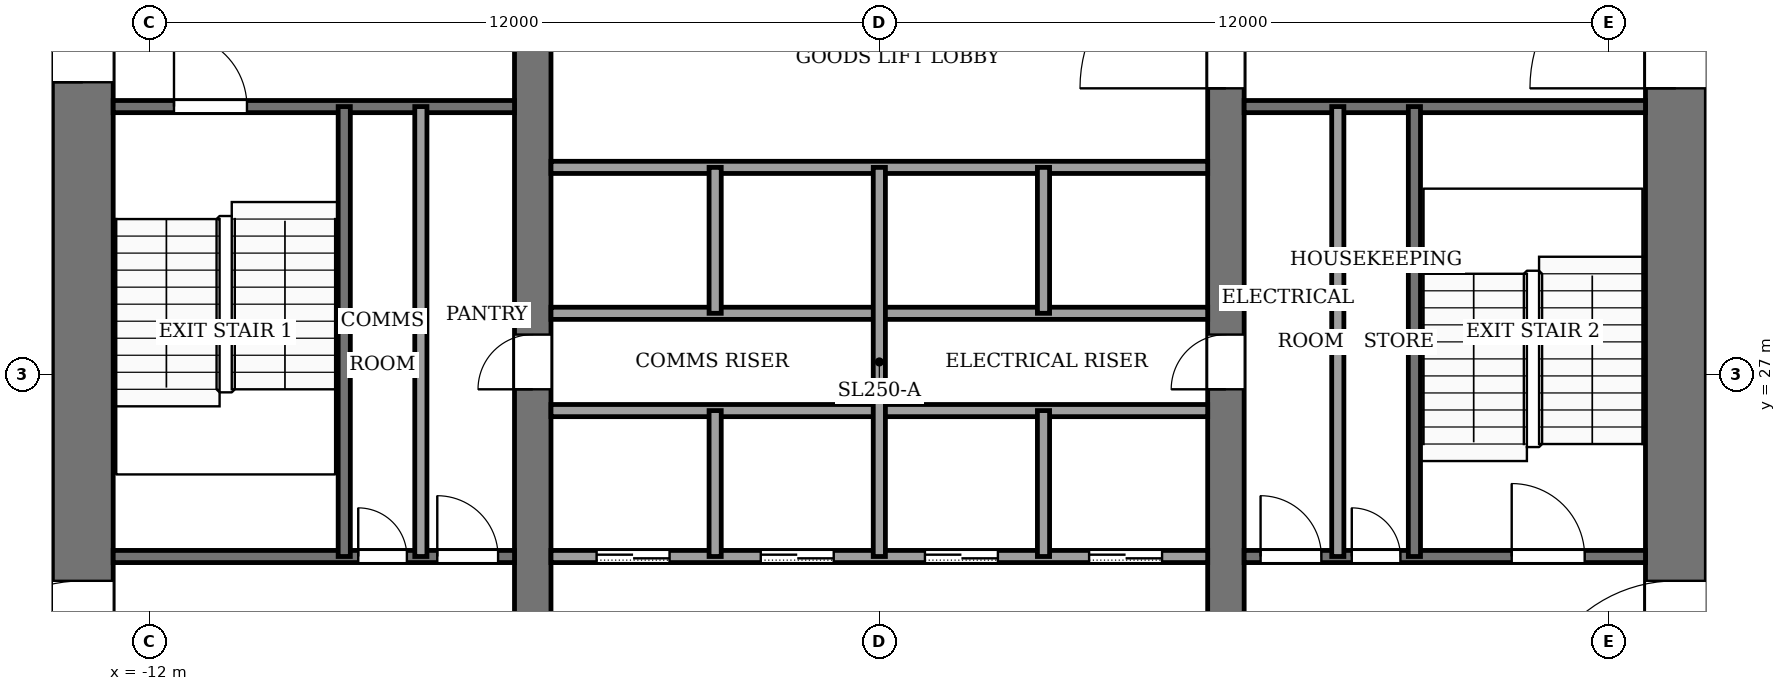
"""IFC4 building model, lengths in metres.
Left out: names, types, materials, properties, quantities, classifications, styles, units other than length and angle.
Written with IfcOpenShell. Run it as: python <this file> out.ifc"""

import sys

from ifc_helpers import new_model, si_unit, direction, frame, frame_2d, origin, place, context, subcontext, project, spatial, rectangle, extrude, element, fill, save


model = new_model("IFC4")
c1 = context("Model", 3, precision=1e-05, world=origin(), true_north=direction((0.0, 1.0)))
c2 = subcontext(c1, "Body", "Model", "MODEL_VIEW")
j1 = project(units=[si_unit("LENGTHUNIT", "METRE"), si_unit("PLANEANGLEUNIT", "RADIAN")], contexts=[c1])
p1 = place(None, origin())
s1 = spatial("IfcSite", under=j1, at=p1, CompositionType="ELEMENT")
p2 = place(p1, origin())
s2 = spatial("IfcBuilding", under=s1, at=p2, CompositionType="ELEMENT")
p3 = place(p2, frame((0.0, 0.0, 130.0)))
s3 = spatial("IfcBuildingStorey", under=s2, at=p3, CompositionType="ELEMENT", Elevation=130.0)
p4 = place(p3, frame((-13.1, 18.4, -0.13), z_axis=(0.0, 0.0, 1.0), x_axis=(0.0, 1.0, 0.0)))
e1 = element("IfcWall", 1, at=p4, inside=s3, PredefinedType="SHEAR", context=c2, shape_type="SweptSolid", body=[
    extrude(rectangle(XDim=19.2, YDim=1.0, at=frame_2d((9.6, 0.0))), origin(), (0.0, 0.0, 1.0), 4.0),
])
p5 = place(p4, frame((2.8, 0.0, 0.13)))
e2 = element("IfcOpeningElement", 2, at=p5, cuts=e1, PredefinedType="OPENING", context=c2, shape_type="SweptSolid", body=[
    extrude(rectangle(XDim=2.4, YDim=2.4, at=frame_2d((1.2, 1.2))), frame((0.0, 0.51, 0.0), z_axis=(0.0, -1.0, 0.0), x_axis=(1.0, 0.0, 0.0)), (0.0, 0.0, 1.0), 1.02),
])
p6 = place(p4, frame((13.4, 0.0, 0.13)))
e3 = element("IfcOpeningElement", 3, at=p6, cuts=e1, PredefinedType="OPENING", context=c2, shape_type="SweptSolid", body=[
    extrude(rectangle(XDim=1.4, YDim=2.2, at=frame_2d((0.7, 1.1))), frame((0.0, 0.51, 0.0), z_axis=(0.0, -1.0, 0.0), x_axis=(1.0, 0.0, 0.0)), (0.0, 0.0, 1.0), 1.02),
])
p7 = place(p3, frame((13.1, 18.4, -0.13), z_axis=(0.0, 0.0, 1.0), x_axis=(0.0, 1.0, 0.0)))
e4 = element("IfcWall", 4, at=p7, inside=s3, PredefinedType="SHEAR", context=c2, shape_type="SweptSolid", body=[
    extrude(rectangle(XDim=19.2, YDim=1.0, at=frame_2d((9.6, 0.0))), origin(), (0.0, 0.0, 1.0), 4.0),
])
p8 = place(p7, frame((2.8, 0.0, 0.13)))
e5 = element("IfcOpeningElement", 5, at=p8, cuts=e4, PredefinedType="OPENING", context=c2, shape_type="SweptSolid", body=[
    extrude(rectangle(XDim=2.4, YDim=2.4, at=frame_2d((1.2, 1.2))), frame((0.0, 0.51, 0.0), z_axis=(0.0, -1.0, 0.0), x_axis=(1.0, 0.0, 0.0)), (0.0, 0.0, 1.0), 1.02),
])
p9 = place(p7, frame((13.3, 0.0, 0.13)))
e6 = element("IfcOpeningElement", 6, at=p9, cuts=e4, PredefinedType="OPENING", context=c2, shape_type="SweptSolid", body=[
    extrude(rectangle(XDim=2.4, YDim=2.4, at=frame_2d((1.2, 1.2))), frame((0.0, 0.51, 0.0), z_axis=(0.0, -1.0, 0.0), x_axis=(1.0, 0.0, 0.0)), (0.0, 0.0, 1.0), 1.02),
])
p10 = place(p3, frame((-5.7, 18.4, -0.13), z_axis=(0.0, 0.0, 1.0), x_axis=(0.0, 1.0, 0.0)))
e7 = element("IfcWall", 7, at=p10, inside=s3, PredefinedType="SHEAR", context=c2, shape_type="SweptSolid", body=[
    extrude(rectangle(XDim=19.2, YDim=0.6, at=frame_2d((9.6, 0.0))), origin(), (0.0, 0.0, 1.0), 4.0),
])
p11 = place(p10, frame((8.35, 0.0, 0.13)))
e8 = element("IfcOpeningElement", 8, at=p11, cuts=e7, PredefinedType="OPENING", context=c2, shape_type="SweptSolid", body=[
    extrude(rectangle(XDim=0.9, YDim=2.1, at=frame_2d((0.45, 1.05))), frame((0.0, 0.31, 0.0), z_axis=(0.0, -1.0, 0.0), x_axis=(1.0, 0.0, 0.0)), (0.0, 0.0, 1.0), 0.62),
])
p12 = place(p3, frame((5.7, 18.4, -0.13), z_axis=(0.0, 0.0, 1.0), x_axis=(0.0, 1.0, 0.0)))
e9 = element("IfcWall", 9, at=p12, inside=s3, PredefinedType="SHEAR", context=c2, shape_type="SweptSolid", body=[
    extrude(rectangle(XDim=19.2, YDim=0.6, at=frame_2d((9.6, 0.0))), origin(), (0.0, 0.0, 1.0), 4.0),
])
p13 = place(p12, frame((8.35, 0.0, 0.13)))
e10 = element("IfcOpeningElement", 10, at=p13, cuts=e9, PredefinedType="OPENING", context=c2, shape_type="SweptSolid", body=[
    extrude(rectangle(XDim=0.9, YDim=2.1, at=frame_2d((0.45, 1.05))), frame((0.0, 0.31, 0.0), z_axis=(0.0, -1.0, 0.0), x_axis=(1.0, 0.0, 0.0)), (0.0, 0.0, 1.0), 0.62),
])
p14 = place(p12, frame((13.3, 0.0, 0.13)))
e11 = element("IfcOpeningElement", 11, at=p14, cuts=e9, PredefinedType="OPENING", context=c2, shape_type="SweptSolid", body=[
    extrude(rectangle(XDim=2.4, YDim=2.4, at=frame_2d((1.2, 1.2))), frame((0.0, 0.31, 0.0), z_axis=(0.0, -1.0, 0.0), x_axis=(1.0, 0.0, 0.0)), (0.0, 0.0, 1.0), 0.62),
])
p15 = place(p3, frame((-12.6, 24.0, 0.0), z_axis=(0.0, 0.0, 1.0), x_axis=(1.0, 0.0, 0.0)))
e12 = element("IfcWall", 12, at=p15, inside=s3, PredefinedType="PARTITIONING", context=c2, shape_type="SweptSolid", body=[
    extrude(rectangle(XDim=6.6, YDim=0.2, at=frame_2d((3.3, 0.0))), origin(), (0.0, 0.0, 1.0), 3.87),
])
p16 = place(p15, frame((4.03, 0.0, 0.0)))
e13 = element("IfcOpeningElement", 13, at=p16, cuts=e12, PredefinedType="OPENING", context=c2, shape_type="SweptSolid", body=[
    extrude(rectangle(XDim=0.8, YDim=2.1, at=frame_2d((0.4, 1.05))), frame((0.0, 0.11, 0.0), z_axis=(0.0, -1.0, 0.0), x_axis=(1.0, 0.0, 0.0)), (0.0, 0.0, 1.0), 0.22),
])
p17 = place(p15, frame((5.33, 0.0, 0.0)))
e14 = element("IfcOpeningElement", 14, at=p17, cuts=e12, PredefinedType="OPENING", context=c2, shape_type="SweptSolid", body=[
    extrude(rectangle(XDim=1.0, YDim=2.1, at=frame_2d((0.5, 1.05))), frame((0.0, 0.11, 0.0), z_axis=(0.0, -1.0, 0.0), x_axis=(1.0, 0.0, 0.0)), (0.0, 0.0, 1.0), 0.22),
])
p18 = place(p3, frame((-5.4, 24.0, 0.0), z_axis=(0.0, 0.0, 1.0), x_axis=(1.0, 0.0, 0.0)))
e15 = element("IfcWall", 15, at=p18, inside=s3, PredefinedType="PARTITIONING", context=c2, shape_type="SweptSolid", body=[
    extrude(rectangle(XDim=10.8, YDim=0.2, at=frame_2d((5.4, 0.0))), origin(), (0.0, 0.0, 1.0), 3.87),
])
p19 = place(p18, frame((0.75, 0.0, 0.0)))
e16 = element("IfcOpeningElement", 16, at=p19, cuts=e15, PredefinedType="OPENING", context=c2, shape_type="SweptSolid", body=[
    extrude(rectangle(XDim=1.2, YDim=2.2, at=frame_2d((0.6, 1.1))), frame((0.0, 0.11, 0.0), z_axis=(0.0, -1.0, 0.0), x_axis=(1.0, 0.0, 0.0)), (0.0, 0.0, 1.0), 0.22),
])
p20 = place(p18, frame((3.45, 0.0, 0.0)))
e17 = element("IfcOpeningElement", 17, at=p20, cuts=e15, PredefinedType="OPENING", context=c2, shape_type="SweptSolid", body=[
    extrude(rectangle(XDim=1.2, YDim=2.2, at=frame_2d((0.6, 1.1))), frame((0.0, 0.11, 0.0), z_axis=(0.0, -1.0, 0.0), x_axis=(1.0, 0.0, 0.0)), (0.0, 0.0, 1.0), 0.22),
])
p21 = place(p18, frame((6.15, 0.0, 0.0)))
e18 = element("IfcOpeningElement", 18, at=p21, cuts=e15, PredefinedType="OPENING", context=c2, shape_type="SweptSolid", body=[
    extrude(rectangle(XDim=1.2, YDim=2.2, at=frame_2d((0.6, 1.1))), frame((0.0, 0.11, 0.0), z_axis=(0.0, -1.0, 0.0), x_axis=(1.0, 0.0, 0.0)), (0.0, 0.0, 1.0), 0.22),
])
p22 = place(p18, frame((8.85, 0.0, 0.0)))
e19 = element("IfcOpeningElement", 19, at=p22, cuts=e15, PredefinedType="OPENING", context=c2, shape_type="SweptSolid", body=[
    extrude(rectangle(XDim=1.2, YDim=2.2, at=frame_2d((0.6, 1.1))), frame((0.0, 0.11, 0.0), z_axis=(0.0, -1.0, 0.0), x_axis=(1.0, 0.0, 0.0)), (0.0, 0.0, 1.0), 0.22),
])
p23 = place(p3, frame((6.0, 24.0, 0.0), z_axis=(0.0, 0.0, 1.0), x_axis=(1.0, 0.0, 0.0)))
e20 = element("IfcWall", 20, at=p23, inside=s3, PredefinedType="PARTITIONING", context=c2, shape_type="SweptSolid", body=[
    extrude(rectangle(XDim=6.6, YDim=0.2, at=frame_2d((3.3, 0.0))), origin(), (0.0, 0.0, 1.0), 3.87),
])
p24 = place(p23, frame((0.27, 0.0, 0.0)))
e21 = element("IfcOpeningElement", 21, at=p24, cuts=e20, PredefinedType="OPENING", context=c2, shape_type="SweptSolid", body=[
    extrude(rectangle(XDim=1.0, YDim=2.1, at=frame_2d((0.5, 1.05))), frame((0.0, 0.11, 0.0), z_axis=(0.0, -1.0, 0.0), x_axis=(1.0, 0.0, 0.0)), (0.0, 0.0, 1.0), 0.22),
])
p25 = place(p23, frame((1.77, 0.0, 0.0)))
e22 = element("IfcOpeningElement", 22, at=p25, cuts=e20, PredefinedType="OPENING", context=c2, shape_type="SweptSolid", body=[
    extrude(rectangle(XDim=0.8, YDim=2.1, at=frame_2d((0.4, 1.05))), frame((0.0, 0.11, 0.0), z_axis=(0.0, -1.0, 0.0), x_axis=(1.0, 0.0, 0.0)), (0.0, 0.0, 1.0), 0.22),
])
p26 = place(p23, frame((4.4, 0.0, 0.0)))
e23 = element("IfcOpeningElement", 23, at=p26, cuts=e20, PredefinedType="OPENING", context=c2, shape_type="SweptSolid", body=[
    extrude(rectangle(XDim=1.2, YDim=2.2, at=frame_2d((0.6, 1.1))), frame((0.0, 0.11, 0.0), z_axis=(0.0, -1.0, 0.0), x_axis=(1.0, 0.0, 0.0)), (0.0, 0.0, 1.0), 0.22),
])
for number, where, z_axis, x_axis in (
    (24, (-5.4, 26.4, 0.0), (0.0, 0.0, 1.0), (1.0, 0.0, 0.0)),
    (25, (-5.4, 28.0, 0.0), (0.0, 0.0, 1.0), (1.0, 0.0, 0.0)),
    (26, (-5.4, 30.4, 0.0), (0.0, 0.0, 1.0), (1.0, 0.0, 0.0)),
):
    element("IfcWall", number, at=place(p3, frame(where, z_axis=z_axis, x_axis=x_axis)), inside=s3, PredefinedType="PARTITIONING", context=c2, shape_type="SweptSolid", body=[
        extrude(rectangle(XDim=10.8, YDim=0.2, at=frame_2d((5.4, 0.0))), origin(), (0.0, 0.0, 1.0), 3.87),
    ])
p27 = place(p3, frame((-12.6, 31.4, 0.0), z_axis=(0.0, 0.0, 1.0), x_axis=(1.0, 0.0, 0.0)))
e27 = element("IfcWall", 27, at=p27, inside=s3, PredefinedType="PARTITIONING", context=c2, shape_type="SweptSolid", body=[
    extrude(rectangle(XDim=6.6, YDim=0.2, at=frame_2d((3.3, 0.0))), origin(), (0.0, 0.0, 1.0), 3.87),
])
p28 = place(p27, frame((1.0, 0.0, 0.0)))
e28 = element("IfcOpeningElement", 28, at=p28, cuts=e27, PredefinedType="OPENING", context=c2, shape_type="SweptSolid", body=[
    extrude(rectangle(XDim=1.2, YDim=2.2, at=frame_2d((0.6, 1.1))), frame((0.0, 0.11, 0.0), z_axis=(0.0, -1.0, 0.0), x_axis=(1.0, 0.0, 0.0)), (0.0, 0.0, 1.0), 0.22),
])
p29 = place(p3, frame((6.0, 31.4, 0.0), z_axis=(0.0, 0.0, 1.0), x_axis=(1.0, 0.0, 0.0)))
e29 = element("IfcWall", 29, at=p29, inside=s3, PredefinedType="PARTITIONING", context=c2, shape_type="SweptSolid", body=[
    extrude(rectangle(XDim=6.6, YDim=0.2, at=frame_2d((3.3, 0.0))), origin(), (0.0, 0.0, 1.0), 3.87),
])
for number, where, z_axis, x_axis in (
    (30, (-8.8, 24.0, 0.0), (0.0, 0.0, 1.0), (0.0, 1.0, 0.0)),
    (31, (-7.54, 24.0, 0.0), (0.0, 0.0, 1.0), (0.0, 1.0, 0.0)),
):
    element("IfcWall", number, at=place(p3, frame(where, z_axis=z_axis, x_axis=x_axis)), inside=s3, PredefinedType="PARTITIONING", context=c2, shape_type="SweptSolid", body=[
        extrude(rectangle(XDim=7.4, YDim=0.2, at=frame_2d((3.7, 0.0))), origin(), (0.0, 0.0, 1.0), 3.87),
    ])
for number, where, z_axis, x_axis in (
    (32, (-2.7, 24.0, 0.0), (0.0, 0.0, 1.0), (0.0, 1.0, 0.0)),
    (33, (-2.7, 28.0, 0.0), (0.0, 0.0, 1.0), (0.0, 1.0, 0.0)),
):
    element("IfcWall", number, at=place(p3, frame(where, z_axis=z_axis, x_axis=x_axis)), inside=s3, PredefinedType="PARTITIONING", context=c2, shape_type="SweptSolid", body=[
        extrude(rectangle(XDim=2.4, YDim=0.2, at=frame_2d((1.2, 0.0))), origin(), (0.0, 0.0, 1.0), 3.87),
    ])
p30 = place(p3, frame((0.0, 24.0, 0.0), z_axis=(0.0, 0.0, 1.0), x_axis=(0.0, 1.0, 0.0)))
e34 = element("IfcWall", 34, at=p30, inside=s3, PredefinedType="PARTITIONING", context=c2, shape_type="SweptSolid", body=[
    extrude(rectangle(XDim=6.4, YDim=0.2, at=frame_2d((3.2, 0.0))), origin(), (0.0, 0.0, 1.0), 3.87),
])
for number, where, z_axis, x_axis in (
    (35, (2.7, 24.0, 0.0), (0.0, 0.0, 1.0), (0.0, 1.0, 0.0)),
    (36, (2.7, 28.0, 0.0), (0.0, 0.0, 1.0), (0.0, 1.0, 0.0)),
):
    element("IfcWall", number, at=place(p3, frame(where, z_axis=z_axis, x_axis=x_axis)), inside=s3, PredefinedType="PARTITIONING", context=c2, shape_type="SweptSolid", body=[
        extrude(rectangle(XDim=2.4, YDim=0.2, at=frame_2d((1.2, 0.0))), origin(), (0.0, 0.0, 1.0), 3.87),
    ])
for number, where, z_axis, x_axis in (
    (37, (7.54, 24.0, 0.0), (0.0, 0.0, 1.0), (0.0, 1.0, 0.0)),
    (38, (8.8, 24.0, 0.0), (0.0, 0.0, 1.0), (0.0, 1.0, 0.0)),
):
    element("IfcWall", number, at=place(p3, frame(where, z_axis=z_axis, x_axis=x_axis)), inside=s3, PredefinedType="PARTITIONING", context=c2, shape_type="SweptSolid", body=[
        extrude(rectangle(XDim=7.4, YDim=0.2, at=frame_2d((3.7, 0.0))), origin(), (0.0, 0.0, 1.0), 3.87),
    ])
p31 = place(p19, origin())
e39 = element("IfcDoor", 39, at=p31, inside=s3, OperationType="SLIDING_TO_LEFT", PredefinedType="DOOR", context=c2, shape_type="SweptSolid", body=[
    extrude(rectangle(XDim=1.2, YDim=2.2, at=frame_2d((0.6, 1.1))), frame((0.0, 0.025, 0.0), z_axis=(0.0, -1.0, 0.0), x_axis=(1.0, 0.0, 0.0)), (0.0, 0.0, 1.0), 0.05),
])
fill(e16, e39)
p32 = place(p20, origin())
e40 = element("IfcDoor", 40, at=p32, inside=s3, OperationType="SLIDING_TO_LEFT", PredefinedType="DOOR", context=c2, shape_type="SweptSolid", body=[
    extrude(rectangle(XDim=1.2, YDim=2.2, at=frame_2d((0.6, 1.1))), frame((0.0, 0.025, 0.0), z_axis=(0.0, -1.0, 0.0), x_axis=(1.0, 0.0, 0.0)), (0.0, 0.0, 1.0), 0.05),
])
fill(e17, e40)
p33 = place(p21, origin())
e41 = element("IfcDoor", 41, at=p33, inside=s3, OperationType="SLIDING_TO_LEFT", PredefinedType="DOOR", context=c2, shape_type="SweptSolid", body=[
    extrude(rectangle(XDim=1.2, YDim=2.2, at=frame_2d((0.6, 1.1))), frame((0.0, 0.025, 0.0), z_axis=(0.0, -1.0, 0.0), x_axis=(1.0, 0.0, 0.0)), (0.0, 0.0, 1.0), 0.05),
])
fill(e18, e41)
p34 = place(p22, origin())
e42 = element("IfcDoor", 42, at=p34, inside=s3, OperationType="SLIDING_TO_LEFT", PredefinedType="DOOR", context=c2, shape_type="SweptSolid", body=[
    extrude(rectangle(XDim=1.2, YDim=2.2, at=frame_2d((0.6, 1.1))), frame((0.0, 0.025, 0.0), z_axis=(0.0, -1.0, 0.0), x_axis=(1.0, 0.0, 0.0)), (0.0, 0.0, 1.0), 0.05),
])
fill(e19, e42)
p35 = place(p16, origin())
e43 = element("IfcDoor", 43, at=p35, inside=s3, OperationType="SINGLE_SWING_RIGHT", PredefinedType="DOOR", context=c2, shape_type="SweptSolid", body=[
    extrude(rectangle(XDim=0.8, YDim=2.1, at=frame_2d((0.4, 1.05))), frame((0.0, 0.025, 0.0), z_axis=(0.0, -1.0, 0.0), x_axis=(1.0, 0.0, 0.0)), (0.0, 0.0, 1.0), 0.05),
])
fill(e13, e43)
p36 = place(p17, origin())
e44 = element("IfcDoor", 44, at=p36, inside=s3, OperationType="SINGLE_SWING_LEFT", PredefinedType="DOOR", context=c2, shape_type="SweptSolid", body=[
    extrude(rectangle(XDim=1.0, YDim=2.1, at=frame_2d((0.5, 1.05))), frame((0.0, 0.025, 0.0), z_axis=(0.0, -1.0, 0.0), x_axis=(1.0, 0.0, 0.0)), (0.0, 0.0, 1.0), 0.05),
])
fill(e14, e44)
p37 = place(p24, origin())
e45 = element("IfcDoor", 45, at=p37, inside=s3, OperationType="SINGLE_SWING_RIGHT", PredefinedType="DOOR", context=c2, shape_type="SweptSolid", body=[
    extrude(rectangle(XDim=1.0, YDim=2.1, at=frame_2d((0.5, 1.05))), frame((0.0, 0.025, 0.0), z_axis=(0.0, -1.0, 0.0), x_axis=(1.0, 0.0, 0.0)), (0.0, 0.0, 1.0), 0.05),
])
fill(e21, e45)
p38 = place(p25, origin())
e46 = element("IfcDoor", 46, at=p38, inside=s3, OperationType="SINGLE_SWING_LEFT", PredefinedType="DOOR", context=c2, shape_type="SweptSolid", body=[
    extrude(rectangle(XDim=0.8, YDim=2.1, at=frame_2d((0.4, 1.05))), frame((0.0, 0.025, 0.0), z_axis=(0.0, -1.0, 0.0), x_axis=(1.0, 0.0, 0.0)), (0.0, 0.0, 1.0), 0.05),
])
fill(e22, e46)
p39 = place(p11, origin())
e47 = element("IfcDoor", 47, at=p39, inside=s3, OperationType="SINGLE_SWING_RIGHT", PredefinedType="DOOR", context=c2, shape_type="SweptSolid", body=[
    extrude(rectangle(XDim=0.9, YDim=2.1, at=frame_2d((0.45, 1.05))), frame((0.0, 0.025, 0.0), z_axis=(0.0, -1.0, 0.0), x_axis=(1.0, 0.0, 0.0)), (0.0, 0.0, 1.0), 0.05),
])
fill(e8, e47)
p40 = place(p13, origin())
e48 = element("IfcDoor", 48, at=p40, inside=s3, OperationType="SINGLE_SWING_LEFT", PredefinedType="DOOR", context=c2, shape_type="SweptSolid", body=[
    extrude(rectangle(XDim=0.9, YDim=2.1, at=frame_2d((0.45, 1.05))), frame((0.0, 0.025, 0.0), z_axis=(0.0, -1.0, 0.0), x_axis=(1.0, 0.0, 0.0)), (0.0, 0.0, 1.0), 0.05),
])
fill(e10, e48)
p41 = place(p28, origin())
e49 = element("IfcDoor", 49, at=p41, inside=s3, OperationType="SINGLE_SWING_LEFT", PredefinedType="DOOR", context=c2, shape_type="SweptSolid", body=[
    extrude(rectangle(XDim=1.2, YDim=2.2, at=frame_2d((0.6, 1.1))), frame((0.0, 0.025, 0.0), z_axis=(0.0, -1.0, 0.0), x_axis=(1.0, 0.0, 0.0)), (0.0, 0.0, 1.0), 0.05),
])
fill(e28, e49)
p42 = place(p26, origin())
e50 = element("IfcDoor", 50, at=p42, inside=s3, OperationType="SINGLE_SWING_RIGHT", PredefinedType="DOOR", context=c2, shape_type="SweptSolid", body=[
    extrude(rectangle(XDim=1.2, YDim=2.2, at=frame_2d((0.6, 1.1))), frame((0.0, 0.025, 0.0), z_axis=(0.0, -1.0, 0.0), x_axis=(1.0, 0.0, 0.0)), (0.0, 0.0, 1.0), 0.05),
])
fill(e23, e50)
p43 = place(p14, origin())
e51 = element("IfcDoor", 51, at=p43, inside=s3, OperationType="DOUBLE_DOOR_SINGLE_SWING", PredefinedType="DOOR", context=c2, shape_type="SweptSolid", body=[
    extrude(rectangle(XDim=2.4, YDim=2.4, at=frame_2d((1.2, 1.2))), frame((0.0, 0.025, 0.0), z_axis=(0.0, -1.0, 0.0), x_axis=(1.0, 0.0, 0.0)), (0.0, 0.0, 1.0), 0.05),
])
fill(e11, e51)
p44 = place(p5, origin())
e52 = element("IfcDoor", 52, at=p44, inside=s3, OperationType="DOUBLE_DOOR_SINGLE_SWING", PredefinedType="DOOR", context=c2, shape_type="SweptSolid", body=[
    extrude(rectangle(XDim=2.4, YDim=2.4, at=frame_2d((1.2, 1.2))), frame((0.0, 0.025, 0.0), z_axis=(0.0, -1.0, 0.0), x_axis=(1.0, 0.0, 0.0)), (0.0, 0.0, 1.0), 0.05),
])
fill(e2, e52)
p45 = place(p8, origin())
e53 = element("IfcDoor", 53, at=p45, inside=s3, OperationType="DOUBLE_DOOR_SINGLE_SWING", PredefinedType="DOOR", context=c2, shape_type="SweptSolid", body=[
    extrude(rectangle(XDim=2.4, YDim=2.4, at=frame_2d((1.2, 1.2))), frame((0.0, 0.025, 0.0), z_axis=(0.0, -1.0, 0.0), x_axis=(1.0, 0.0, 0.0)), (0.0, 0.0, 1.0), 0.05),
])
fill(e5, e53)
p46 = place(p9, origin())
e54 = element("IfcDoor", 54, at=p46, inside=s3, OperationType="DOUBLE_DOOR_SINGLE_SWING", PredefinedType="DOOR", context=c2, shape_type="SweptSolid", body=[
    extrude(rectangle(XDim=2.4, YDim=2.4, at=frame_2d((1.2, 1.2))), frame((0.0, 0.025, 0.0), z_axis=(0.0, -1.0, 0.0), x_axis=(1.0, 0.0, 0.0)), (0.0, 0.0, 1.0), 0.05),
])
fill(e6, e54)
p47 = place(p6, origin())
e55 = element("IfcDoor", 55, at=p47, inside=s3, OperationType="SINGLE_SWING_LEFT", PredefinedType="DOOR", context=c2, shape_type="SweptSolid", body=[
    extrude(rectangle(XDim=1.4, YDim=2.2, at=frame_2d((0.7, 1.1))), frame((0.0, 0.025, 0.0), z_axis=(0.0, -1.0, 0.0), x_axis=(1.0, 0.0, 0.0)), (0.0, 0.0, 1.0), 0.05),
])
fill(e3, e55)
save(model, sys.argv[1])
